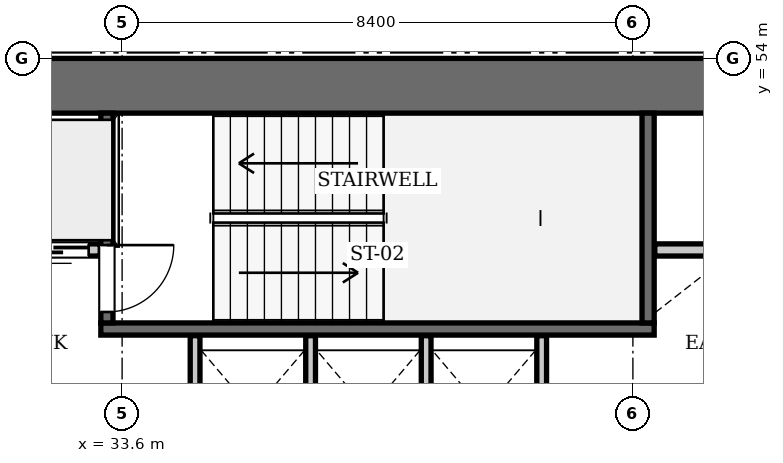
"""IFC4 building model, lengths in metres.
Left out: names, types, materials, properties, quantities, classifications, styles, units other than length and angle.
Written with IfcOpenShell. Run it as: python <this file> out.ifc"""

import sys

from ifc_helpers import new_model, si_unit, direction, frame, frame_2d, origin, place, context, subcontext, project, spatial, rectangle, extrude, element, fill, save


model = new_model("IFC4")
c1 = context("Model", 3, precision=1e-05, world=origin(), true_north=direction((0.0, 1.0)))
c2 = subcontext(c1, "Body", "Model", "MODEL_VIEW")
j1 = project(units=[si_unit("LENGTHUNIT", "METRE"), si_unit("PLANEANGLEUNIT", "RADIAN")], contexts=[c1])
p1 = place(None, origin())
s1 = spatial("IfcSite", under=j1, at=p1, CompositionType="ELEMENT")
p2 = place(p1, origin())
s2 = spatial("IfcBuilding", under=s1, at=p2, CompositionType="ELEMENT")
p3 = place(p2, frame((0.0, 0.0, 111.65)))
s3 = spatial("IfcBuildingStorey", under=s2, at=p3, CompositionType="ELEMENT", Elevation=111.65)
p4 = place(p3, frame((25.2, 53.55, 0.0), z_axis=(0.0, 0.0, 1.0), x_axis=(1.0, 0.0, 0.0)))
e1 = element("IfcWall", 1, at=p4, inside=s3, PredefinedType="SHEAR", context=c2, shape_type="SweptSolid", body=[
    extrude(rectangle(XDim=25.2, YDim=0.9, at=frame_2d((12.6, 0.0))), origin(), (0.0, 0.0, 1.0), 3.85),
])
p5 = place(p3, frame((33.25, 49.55, 0.0), z_axis=(0.0, 0.0, 1.0), x_axis=(1.0, 0.0, 0.0)))
e2 = element("IfcWall", 2, at=p5, inside=s3, PredefinedType="SOLIDWALL", context=c2, shape_type="SweptSolid", body=[
    extrude(rectangle(XDim=9.1, YDim=0.2, at=frame_2d((4.55, 0.0))), origin(), (0.0, 0.0, 1.0), 3.55),
])
p6 = place(p3, frame((42.25, 49.65, 0.0), z_axis=(0.0, 0.0, 1.0), x_axis=(0.0, 1.0, 0.0)))
e3 = element("IfcWall", 3, at=p6, inside=s3, PredefinedType="SOLIDWALL", context=c2, shape_type="SweptSolid", body=[
    extrude(rectangle(XDim=3.45, YDim=0.2, at=frame_2d((1.725, 0.0))), origin(), (0.0, 0.0, 1.0), 3.55),
])
p7 = place(p3, frame((33.35, 49.65, 0.0), z_axis=(0.0, 0.0, 1.0), x_axis=(0.0, 1.0, 0.0)))
e4 = element("IfcWall", 4, at=p7, inside=s3, PredefinedType="SOLIDWALL", context=c2, shape_type="SweptSolid", body=[
    extrude(rectangle(XDim=3.45, YDim=0.2, at=frame_2d((1.725, 0.0))), origin(), (0.0, 0.0, 1.0), 3.55),
])
p8 = place(p7, frame((0.18, 0.0, 0.0)))
e5 = element("IfcOpeningElement", 5, at=p8, cuts=e4, PredefinedType="OPENING", context=c2, shape_type="SweptSolid", body=[
    extrude(rectangle(XDim=1.1, YDim=2.15, at=frame_2d((0.55, 1.075))), frame((0.0, 0.11, 0.0), z_axis=(0.0, -1.0, 0.0), x_axis=(1.0, 0.0, 0.0)), (0.0, 0.0, 1.0), 0.22),
])
p9 = place(p3, frame((31.86, 50.85, 0.0), z_axis=(0.0, 0.0, 1.0), x_axis=(1.0, 0.0, 0.0)))
e6 = element("IfcWall", 6, at=p9, inside=s3, PredefinedType="SOLIDWALL", context=c2, shape_type="SweptSolid", body=[
    extrude(rectangle(XDim=1.38, YDim=0.2, at=frame_2d((0.69, 0.0))), origin(), (0.0, 0.0, 1.0), 3.55),
])
p10 = place(p9, frame((0.19, 0.0, 0.0)))
e7 = element("IfcOpeningElement", 7, at=p10, cuts=e6, PredefinedType="OPENING", context=c2, shape_type="SweptSolid", body=[
    extrude(rectangle(XDim=1.0, YDim=2.15, at=frame_2d((0.5, 1.075))), frame((0.0, 0.11, 0.0), z_axis=(0.0, -1.0, 0.0), x_axis=(1.0, 0.0, 0.0)), (0.0, 0.0, 1.0), 0.22),
])
p11 = place(p3, frame((42.36, 50.85, 0.0), z_axis=(0.0, 0.0, 1.0), x_axis=(1.0, 0.0, 0.0)))
e8 = element("IfcWall", 8, at=p11, inside=s3, PredefinedType="SOLIDWALL", context=c2, shape_type="SweptSolid", body=[
    extrude(rectangle(XDim=1.38, YDim=0.2, at=frame_2d((0.69, 0.0))), origin(), (0.0, 0.0, 1.0), 3.55),
])
for number, where, z_axis, x_axis in (
    (9, (34.8, 47.25, 0.0), (0.0, 0.0, 1.0), (0.0, 1.0, 0.0)),
    (10, (36.7, 47.25, 0.0), (0.0, 0.0, 1.0), (0.0, 1.0, 0.0)),
    (11, (38.6, 47.25, 0.0), (0.0, 0.0, 1.0), (0.0, 1.0, 0.0)),
    (12, (40.5, 47.25, 0.0), (0.0, 0.0, 1.0), (0.0, 1.0, 0.0)),
):
    element("IfcWall", number, at=place(p3, frame(where, z_axis=z_axis, x_axis=x_axis)), inside=s3, PredefinedType="SOLIDWALL", context=c2, shape_type="SweptSolid", body=[
        extrude(rectangle(XDim=2.19, YDim=0.16, at=frame_2d((1.095, 0.0))), origin(), (0.0, 0.0, 1.0), 3.55),
    ])
p12 = place(p8, frame((1.1, 0.0, 0.0), z_axis=(0.0, 0.0, 1.0), x_axis=(-1.0, 0.0, 0.0)))
e13 = element("IfcDoor", 13, at=p12, inside=s3, OperationType="SINGLE_SWING_LEFT", PredefinedType="DOOR", context=c2, shape_type="SweptSolid", body=[
    extrude(rectangle(XDim=1.1, YDim=2.15, at=frame_2d((0.55, 1.075))), frame((0.0, 0.025, 0.0), z_axis=(0.0, -1.0, 0.0), x_axis=(1.0, 0.0, 0.0)), (0.0, 0.0, 1.0), 0.05),
])
fill(e5, e13)
p13 = place(p10, frame((1.0, 0.0, 0.0), z_axis=(0.0, 0.0, 1.0), x_axis=(-1.0, 0.0, 0.0)))
e14 = element("IfcDoor", 14, at=p13, inside=s3, OperationType="SLIDING_TO_LEFT", PredefinedType="DOOR", context=c2, shape_type="SweptSolid", body=[
    extrude(rectangle(XDim=1.0, YDim=2.15, at=frame_2d((0.5, 1.075))), frame((0.0, 0.025, 0.0), z_axis=(0.0, -1.0, 0.0), x_axis=(1.0, 0.0, 0.0)), (0.0, 0.0, 1.0), 0.05),
])
fill(e7, e14)
save(model, sys.argv[1])
